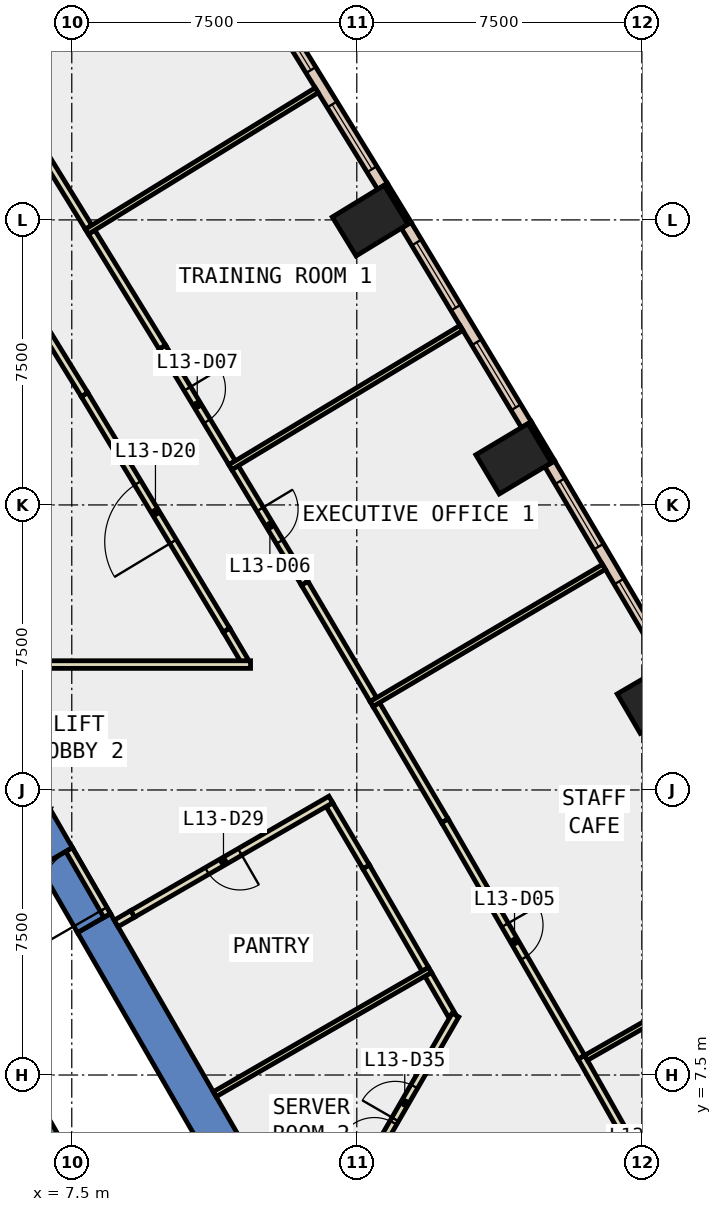
"""IFC4 building model, lengths in metres.
Left out: names, types, materials, properties, quantities, classifications, styles, units other than length and angle.
Written with IfcOpenShell. Run it as: python <this file> out.ifc"""

import sys

from ifc_helpers import new_model, si_unit, direction, frame, frame_2d, origin, origin_2d, place, context, subcontext, project, spatial, polyline, rectangle, outline, extrude, element, fill, save


model = new_model("IFC4")
c1 = context("Model", 3, precision=1e-05, world=origin(), true_north=direction((0.0, 1.0)))
c2 = subcontext(c1, "Body", "Model", "MODEL_VIEW")
j1 = project(units=[si_unit("LENGTHUNIT", "METRE"), si_unit("PLANEANGLEUNIT", "RADIAN")], contexts=[c1])
p1 = place(None, origin())
s1 = spatial("IfcSite", under=j1, at=p1, CompositionType="ELEMENT")
p2 = place(p1, origin())
s2 = spatial("IfcBuilding", under=s1, at=p2, CompositionType="ELEMENT")
p3 = place(p2, frame((0.0, 0.0, 64.4)))
s3 = spatial("IfcBuildingStorey", under=s2, at=p3, CompositionType="ELEMENT", Elevation=64.4)
for number, where, z_axis, x_axis in (
    (1, (22.846, 17.413, -0.4), (0.0, 0.0, 1.0), (-0.504, 0.864, 0.0)),
    (2, (19.127, 23.714, -0.4), (0.0, 0.0, 1.0), (-0.513, 0.858, 0.0)),
    (3, (15.351, 29.981, -0.4), (0.0, 0.0, 1.0), (-0.522, 0.853, 0.0)),
):
    element("IfcColumn", number, at=place(p3, frame(where, z_axis=z_axis, x_axis=x_axis)), inside=s3, PredefinedType="COLUMN", context=c2, shape_type="SweptSolid", body=[
        extrude(rectangle(XDim=1.2, YDim=1.6, at=origin_2d()), origin(), (0.0, 0.0, 1.0), 4.2),
    ])
p4 = place(p3, frame((0.0, 0.0, -0.4)))
e4 = element("IfcWall", 4, at=p4, inside=s3, PredefinedType="SHEAR", context=c2, shape_type="SweptSolid", body=[
    extrude(outline(polyline([(8.517, 11.748), (7.651, 11.248), (12.702, 2.5), (13.856, 2.5), (8.517, 11.748)])), origin(), (0.0, 0.0, 1.0), 4.2),
])
p5 = place(p3, frame((0.0, 0.0, -0.4)))
e5 = element("IfcWall", 5, at=p5, inside=s3, PredefinedType="SHEAR", context=c2, shape_type="SweptSolid", body=[
    extrude(outline(polyline([(6.651, 12.98), (7.517, 13.48), (6.928, 14.5), (6.351, 13.5), (6.651, 12.98)])), origin(), (0.0, 0.0, 1.0), 4.2),
])
p6 = place(p3, frame((0.0, 0.0, 3.6)))
e6 = element("IfcWall", 6, at=p6, inside=s3, PredefinedType="SHEAR", context=c2, shape_type="SweptSolid", body=[
    extrude(outline(polyline([(7.517, 13.48), (6.651, 12.98), (7.651, 11.248), (8.517, 11.748), (7.517, 13.48)])), origin(), (0.0, 0.0, 1.0), 0.2),
])
for number, where, z_axis, x_axis in (
    (7, (20.165, 23.635, 0.0), (0.0, 0.0, 1.0), (-0.513, 0.858, 0.0)),
    (8, (16.389, 29.912, 0.0), (0.0, 0.0, 1.0), (-0.522, 0.853, 0.0)),
):
    element("IfcWall", number, at=place(p3, frame(where, z_axis=z_axis, x_axis=x_axis)), inside=s3, PredefinedType="STANDARD", context=c2, shape_type="SweptSolid", body=[
        extrude(rectangle(XDim=1.2, YDim=0.1, at=frame_2d((0.6, 0.0))), origin(), (0.0, 0.0, 1.0), 3.8),
    ])
p7 = place(p3, frame((23.189, 18.307, 0.0), z_axis=(0.0, 0.0, 1.0), x_axis=(-0.508163938648, 0.861260362177, 0.0)))
e9 = element("IfcWall", 9, at=p7, inside=s3, PredefinedType="STANDARD", context=c2, shape_type="SweptSolid", body=[
    extrude(rectangle(XDim=6.126, YDim=0.3, at=frame_2d((3.063, 0.0))), origin(), (0.0, 0.0, 1.0), 3.8),
])
p8 = place(p7, frame((0.531, 0.0, 0.9)))
e10 = element("IfcOpeningElement", 10, at=p8, cuts=e9, PredefinedType="OPENING", context=c2, shape_type="SweptSolid", body=[
    extrude(rectangle(XDim=2.0, YDim=2.6, at=frame_2d((1.0, 1.3))), frame((0.0, 0.16, 0.0), z_axis=(0.0, -1.0, 0.0), x_axis=(1.0, 0.0, 0.0)), (0.0, 0.0, 1.0), 0.32),
])
p9 = place(p7, frame((3.594, 0.0, 0.9)))
e11 = element("IfcOpeningElement", 11, at=p9, cuts=e9, PredefinedType="OPENING", context=c2, shape_type="SweptSolid", body=[
    extrude(rectangle(XDim=2.0, YDim=2.6, at=frame_2d((1.0, 1.3))), frame((0.0, 0.16, 0.0), z_axis=(0.0, -1.0, 0.0), x_axis=(1.0, 0.0, 0.0)), (0.0, 0.0, 1.0), 0.32),
])
p10 = place(p3, frame((19.462, 24.612, 0.0), z_axis=(0.0, 0.0, 1.0), x_axis=(-0.516147563478, 0.856499674674, 0.0)))
e12 = element("IfcWall", 12, at=p10, inside=s3, PredefinedType="STANDARD", context=c2, shape_type="SweptSolid", body=[
    extrude(rectangle(XDim=6.126, YDim=0.3, at=frame_2d((3.063, 0.0))), origin(), (0.0, 0.0, 1.0), 3.8),
])
p11 = place(p10, frame((0.532, 0.0, 0.9)))
e13 = element("IfcOpeningElement", 13, at=p11, cuts=e12, PredefinedType="OPENING", context=c2, shape_type="SweptSolid", body=[
    extrude(rectangle(XDim=2.0, YDim=2.6, at=frame_2d((1.0, 1.3))), frame((0.0, 0.16, 0.0), z_axis=(0.0, -1.0, 0.0), x_axis=(1.0, 0.0, 0.0)), (0.0, 0.0, 1.0), 0.32),
])
p12 = place(p10, frame((3.595, 0.0, 0.9)))
e14 = element("IfcOpeningElement", 14, at=p12, cuts=e12, PredefinedType="OPENING", context=c2, shape_type="SweptSolid", body=[
    extrude(rectangle(XDim=2.0, YDim=2.6, at=frame_2d((1.0, 1.3))), frame((0.0, 0.16, 0.0), z_axis=(0.0, -1.0, 0.0), x_axis=(1.0, 0.0, 0.0)), (0.0, 0.0, 1.0), 0.32),
])
p13 = place(p3, frame((15.677, 30.882, 0.0), z_axis=(0.0, 0.0, 1.0), x_axis=(-0.524239751329, 0.851570715282, 0.0)))
e15 = element("IfcWall", 15, at=p13, inside=s3, PredefinedType="STANDARD", context=c2, shape_type="SweptSolid", body=[
    extrude(rectangle(XDim=6.125, YDim=0.3, at=frame_2d((3.062, 0.0))), origin(), (0.0, 0.0, 1.0), 3.8),
])
p14 = place(p13, frame((0.531, 0.0, 0.9)))
e16 = element("IfcOpeningElement", 16, at=p14, cuts=e15, PredefinedType="OPENING", context=c2, shape_type="SweptSolid", body=[
    extrude(rectangle(XDim=2.0, YDim=2.6, at=frame_2d((1.0, 1.3))), frame((0.0, 0.16, 0.0), z_axis=(0.0, -1.0, 0.0), x_axis=(1.0, 0.0, 0.0)), (0.0, 0.0, 1.0), 0.32),
])
p15 = place(p13, frame((3.594, 0.0, 0.9)))
e17 = element("IfcOpeningElement", 17, at=p15, cuts=e15, PredefinedType="OPENING", context=c2, shape_type="SweptSolid", body=[
    extrude(rectangle(XDim=2.0, YDim=2.6, at=frame_2d((1.0, 1.3))), frame((0.0, 0.16, 0.0), z_axis=(0.0, -1.0, 0.0), x_axis=(1.0, 0.0, 0.0)), (0.0, 0.0, 1.0), 0.32),
])
p16 = place(p3, frame((17.497, 9.078, 0.0), z_axis=(0.0, 0.0, 1.0), x_axis=(-0.500126451326, 0.865952384768, 0.0)))
e18 = element("IfcWall", 18, at=p16, inside=s3, PredefinedType="PARTITIONING", context=c2, shape_type="SweptSolid", body=[
    extrude(rectangle(XDim=1.238, YDim=0.2, at=frame_2d((0.619, 0.0))), origin(), (0.0, 0.0, 1.0), 3.8),
])
p17 = place(p3, frame((16.803, 10.28, 0.0), z_axis=(0.0, 0.0, 1.0), x_axis=(-0.499941881293, 0.866058956036, 0.0)))
e19 = element("IfcWall", 19, at=p17, inside=s3, PredefinedType="PARTITIONING", context=c2, shape_type="SweptSolid", body=[
    extrude(rectangle(XDim=3.114, YDim=0.2, at=frame_2d((1.557, 0.0))), origin(), (0.0, 0.0, 1.0), 3.8),
])
p18 = place(p3, frame((15.246, 12.977, 0.0), z_axis=(0.0, 0.0, 1.0), x_axis=(-0.508473864329, 0.861077423519, 0.0)))
e20 = element("IfcWall", 20, at=p18, inside=s3, PredefinedType="PARTITIONING", context=c2, shape_type="SweptSolid", body=[
    extrude(rectangle(XDim=1.9, YDim=0.2, at=frame_2d((0.95, 0.0))), origin(), (0.0, 0.0, 1.0), 3.8),
])
p19 = place(p3, frame((14.316, 14.75, 0.0), z_axis=(0.0, 0.0, 1.0), x_axis=(-0.865981716183, -0.500075661512, 0.0)))
e21 = element("IfcWall", 21, at=p19, inside=s3, PredefinedType="PARTITIONING", context=c2, shape_type="SweptSolid", body=[
    extrude(rectangle(XDim=6.023, YDim=0.2, at=frame_2d((3.011, 0.0))), origin(), (0.0, 0.0, 1.0), 3.8),
])
p20 = place(p19, frame((2.761, 0.0, 0.0)))
e22 = element("IfcOpeningElement", 22, at=p20, cuts=e21, PredefinedType="OPENING", context=c2, shape_type="SweptSolid", body=[
    extrude(rectangle(XDim=1.0, YDim=2.1, at=frame_2d((0.5, 1.05))), frame((0.0, 0.11, 0.0), z_axis=(0.0, -1.0, 0.0), x_axis=(1.0, 0.0, 0.0)), (0.0, 0.0, 1.0), 0.22),
])
p21 = place(p3, frame((12.054, 18.386, 0.0), z_axis=(0.0, 0.0, 1.0), x_axis=(-0.508048285953, 0.861328589529, 0.0)))
e23 = element("IfcWall", 23, at=p21, inside=s3, PredefinedType="PARTITIONING", context=c2, shape_type="SweptSolid", body=[
    extrude(rectangle(XDim=0.954, YDim=0.2, at=frame_2d((0.477, 0.0))), origin(), (0.0, 0.0, 1.0), 3.8),
])
p22 = place(p3, frame((11.569, 19.208, 0.0), z_axis=(0.0, 0.0, 1.0), x_axis=(-0.516172233954, 0.85648480716, 0.0)))
e24 = element("IfcWall", 24, at=p22, inside=s3, PredefinedType="PARTITIONING", context=c2, shape_type="SweptSolid", body=[
    extrude(rectangle(XDim=7.234, YDim=0.2, at=frame_2d((3.617, 0.0))), origin(), (0.0, 0.0, 1.0), 3.8),
])
p23 = place(p22, frame((2.717, 0.0, 0.0)))
e25 = element("IfcOpeningElement", 25, at=p23, cuts=e24, PredefinedType="OPENING", context=c2, shape_type="SweptSolid", body=[
    extrude(rectangle(XDim=1.8, YDim=2.1, at=frame_2d((0.9, 1.05))), frame((0.0, 0.11, 0.0), z_axis=(0.0, -1.0, 0.0), x_axis=(1.0, 0.0, 0.0)), (0.0, 0.0, 1.0), 0.22),
])
p24 = place(p3, frame((7.835, 25.404, 0.0), z_axis=(0.0, 0.0, 1.0), x_axis=(-0.524225471951, 0.851579505717, 0.0)))
e26 = element("IfcWall", 26, at=p24, inside=s3, PredefinedType="PARTITIONING", context=c2, shape_type="SweptSolid", body=[
    extrude(rectangle(XDim=7.233, YDim=0.2, at=frame_2d((3.617, 0.0))), origin(), (0.0, 0.0, 1.0), 3.8),
])
p25 = place(p3, frame((20.909, 7.969, 0.0), z_axis=(0.0, 0.0, 1.0), x_axis=(0.491808171064, -0.870703579225, 0.0)))
e27 = element("IfcWall", 27, at=p25, inside=s3, PredefinedType="PARTITIONING", context=c2, shape_type="SweptSolid", body=[
    extrude(rectangle(XDim=7.332, YDim=0.2, at=frame_2d((3.666, 0.0))), origin(), (0.0, 0.0, 1.0), 3.8),
])
p26 = place(p25, frame((3.166, 0.0, 0.0)))
e28 = element("IfcOpeningElement", 28, at=p26, cuts=e27, PredefinedType="OPENING", context=c2, shape_type="SweptSolid", body=[
    extrude(rectangle(XDim=1.0, YDim=2.1, at=frame_2d((0.5, 1.05))), frame((0.0, 0.11, 0.0), z_axis=(0.0, -1.0, 0.0), x_axis=(1.0, 0.0, 0.0)), (0.0, 0.0, 1.0), 0.22),
])
p27 = place(p3, frame((15.512, 17.248, 0.0), z_axis=(0.0, 0.0, 1.0), x_axis=(0.508178415101, -0.861251820564, 0.0)))
e29 = element("IfcWall", 29, at=p27, inside=s3, PredefinedType="PARTITIONING", context=c2, shape_type="SweptSolid", body=[
    extrude(rectangle(XDim=3.554, YDim=0.2, at=frame_2d((1.777, 0.0))), origin(), (0.0, 0.0, 1.0), 3.8),
])
p28 = place(p3, frame((17.318, 14.187, 0.0), z_axis=(0.0, 0.0, 1.0), x_axis=(0.499986381413, -0.866033266336, 0.0)))
e30 = element("IfcWall", 30, at=p28, inside=s3, PredefinedType="PARTITIONING", context=c2, shape_type="SweptSolid", body=[
    extrude(rectangle(XDim=7.18, YDim=0.2, at=frame_2d((3.59, 0.0))), origin(), (0.0, 0.0, 1.0), 3.8),
])
p29 = place(p28, frame((3.165, 0.0, 0.0)))
e31 = element("IfcOpeningElement", 31, at=p29, cuts=e30, PredefinedType="OPENING", context=c2, shape_type="SweptSolid", body=[
    extrude(rectangle(XDim=1.0, YDim=2.1, at=frame_2d((0.5, 1.05))), frame((0.0, 0.11, 0.0), z_axis=(0.0, -1.0, 0.0), x_axis=(1.0, 0.0, 0.0)), (0.0, 0.0, 1.0), 0.22),
])
p30 = place(p3, frame((11.796, 23.481, 0.0), z_axis=(0.0, 0.0, 1.0), x_axis=(0.516070934647, -0.8565458484, 0.0)))
e32 = element("IfcWall", 32, at=p30, inside=s3, PredefinedType="PARTITIONING", context=c2, shape_type="SweptSolid", body=[
    extrude(rectangle(XDim=3.554, YDim=0.2, at=frame_2d((1.777, 0.0))), origin(), (0.0, 0.0, 1.0), 3.8),
])
p31 = place(p30, frame((1.277, 0.0, 0.0)))
e33 = element("IfcOpeningElement", 33, at=p31, cuts=e32, PredefinedType="OPENING", context=c2, shape_type="SweptSolid", body=[
    extrude(rectangle(XDim=1.0, YDim=2.1, at=frame_2d((0.5, 1.05))), frame((0.0, 0.11, 0.0), z_axis=(0.0, -1.0, 0.0), x_axis=(1.0, 0.0, 0.0)), (0.0, 0.0, 1.0), 0.22),
])
p32 = place(p3, frame((13.63, 20.437, 0.0), z_axis=(0.0, 0.0, 1.0), x_axis=(0.508298695021, -0.861180838523, 0.0)))
e34 = element("IfcWall", 34, at=p32, inside=s3, PredefinedType="PARTITIONING", context=c2, shape_type="SweptSolid", body=[
    extrude(rectangle(XDim=3.553, YDim=0.2, at=frame_2d((1.777, 0.0))), origin(), (0.0, 0.0, 1.0), 3.8),
])
p33 = place(p3, frame((8.022, 29.678, 0.0), z_axis=(0.0, 0.0, 1.0), x_axis=(0.524093591744, -0.851660676029, 0.0)))
e35 = element("IfcWall", 35, at=p33, inside=s3, PredefinedType="PARTITIONING", context=c2, shape_type="SweptSolid", body=[
    extrude(rectangle(XDim=3.553, YDim=0.2, at=frame_2d((1.776, 0.0))), origin(), (0.0, 0.0, 1.0), 3.8),
])
p34 = place(p3, frame((9.884, 26.652, 0.0), z_axis=(0.0, 0.0, 1.0), x_axis=(0.516162051318, -0.856490943781, 0.0)))
e36 = element("IfcWall", 36, at=p34, inside=s3, PredefinedType="PARTITIONING", context=c2, shape_type="SweptSolid", body=[
    extrude(rectangle(XDim=3.553, YDim=0.2, at=frame_2d((1.777, 0.0))), origin(), (0.0, 0.0, 1.0), 3.8),
])
p35 = place(p34, frame((1.277, 0.0, 0.0)))
e37 = element("IfcOpeningElement", 37, at=p35, cuts=e36, PredefinedType="OPENING", context=c2, shape_type="SweptSolid", body=[
    extrude(rectangle(XDim=1.0, YDim=2.1, at=frame_2d((0.5, 1.05))), frame((0.0, 0.11, 0.0), z_axis=(0.0, -1.0, 0.0), x_axis=(1.0, 0.0, 0.0)), (0.0, 0.0, 1.0), 0.22),
])
p36 = place(p3, frame((6.081, 32.832, 0.0), z_axis=(0.0, 0.0, 1.0), x_axis=(0.524062922014, -0.851679548756, 0.0)))
e38 = element("IfcWall", 38, at=p36, inside=s3, PredefinedType="PARTITIONING", context=c2, shape_type="SweptSolid", body=[
    extrude(rectangle(XDim=3.553, YDim=0.2, at=frame_2d((1.777, 0.0))), origin(), (0.0, 0.0, 1.0), 3.8),
])
p37 = place(p3, frame((11.261, 6.994, 0.0), z_axis=(0.0, 0.0, 1.0), x_axis=(0.866043905515, 0.499967952693, 0.0)))
e39 = element("IfcWall", 39, at=p37, inside=s3, PredefinedType="PARTITIONING", context=c2, shape_type="SweptSolid", body=[
    extrude(rectangle(XDim=6.542, YDim=0.15, at=frame_2d((3.271, 0.0))), origin(), (0.0, 0.0, 1.0), 3.8),
])
p38 = place(p3, frame((13.827, 2.55, 0.0), z_axis=(0.0, 0.0, 1.0), x_axis=(0.500116794417, 0.865957961995, 0.0)))
e40 = element("IfcWall", 40, at=p38, inside=s3, PredefinedType="PARTITIONING", context=c2, shape_type="SweptSolid", body=[
    extrude(rectangle(XDim=7.538, YDim=0.2, at=frame_2d((3.769, 0.0))), origin(), (0.0, 0.0, 1.0), 3.8),
])
p39 = place(p38, frame((3.269, 0.0, 0.0)))
e41 = element("IfcOpeningElement", 41, at=p39, cuts=e40, PredefinedType="OPENING", context=c2, shape_type="SweptSolid", body=[
    extrude(rectangle(XDim=1.0, YDim=2.1, at=frame_2d((0.5, 1.05))), frame((0.0, 0.11, 0.0), z_axis=(0.0, -1.0, 0.0), x_axis=(1.0, 0.0, 0.0)), (0.0, 0.0, 1.0), 0.22),
])
p40 = place(p38, frame((4.369, 0.0, 0.0)))
e42 = element("IfcOpeningElement", 42, at=p40, cuts=e40, PredefinedType="OPENING", context=c2, shape_type="SweptSolid", body=[
    extrude(rectangle(XDim=1.0, YDim=2.1, at=frame_2d((0.5, 1.05))), frame((0.0, 0.11, 0.0), z_axis=(0.0, -1.0, 0.0), x_axis=(1.0, 0.0, 0.0)), (0.0, 0.0, 1.0), 0.22),
])
p41 = place(p3, frame((21.033, 7.953, 0.0), z_axis=(0.0, 0.0, 1.0), x_axis=(0.868311678357, 0.496018980715, 0.0)))
e43 = element("IfcWall", 43, at=p41, inside=s3, PredefinedType="PARTITIONING", context=c2, shape_type="SweptSolid", body=[
    extrude(rectangle(XDim=5.48, YDim=0.15, at=frame_2d((2.74, 0.0))), origin(), (0.0, 0.0, 1.0), 3.8),
])
p42 = place(p3, frame((15.388, 17.261, 0.0), z_axis=(0.0, 0.0, 1.0), x_axis=(0.861189945173, 0.50828326584, 0.0)))
e44 = element("IfcWall", 44, at=p42, inside=s3, PredefinedType="PARTITIONING", context=c2, shape_type="SweptSolid", body=[
    extrude(rectangle(XDim=7.101, YDim=0.15, at=frame_2d((3.55, 0.0))), origin(), (0.0, 0.0, 1.0), 3.8),
])
p43 = place(p3, frame((11.672, 23.493, 0.0), z_axis=(0.0, 0.0, 1.0), x_axis=(0.856462653555, 0.516208991656, 0.0)))
e45 = element("IfcWall", 45, at=p43, inside=s3, PredefinedType="PARTITIONING", context=c2, shape_type="SweptSolid", body=[
    extrude(rectangle(XDim=7.1, YDim=0.15, at=frame_2d((3.55, 0.0))), origin(), (0.0, 0.0, 1.0), 3.8),
])
p44 = place(p3, frame((7.897, 29.69, 0.0), z_axis=(0.0, 0.0, 1.0), x_axis=(0.851604009471, 0.524185664677, 0.0)))
e46 = element("IfcWall", 46, at=p44, inside=s3, PredefinedType="PARTITIONING", context=c2, shape_type="SweptSolid", body=[
    extrude(rectangle(XDim=7.101, YDim=0.15, at=frame_2d((3.55, 0.0))), origin(), (0.0, 0.0, 1.0), 3.8),
])
p45 = place(p3, frame((8.43, 11.698, 0.0), z_axis=(0.0, 0.0, 1.0), x_axis=(-0.50002537861, 0.866010750942, 0.0)))
e47 = element("IfcWall", 47, at=p45, inside=s3, PredefinedType="PARTITIONING", context=c2, shape_type="SweptSolid", body=[
    extrude(rectangle(XDim=2.0, YDim=0.2, at=frame_2d((1.0, 0.0))), origin(), (0.0, 0.0, 1.0), 2.4),
])
p46 = place(p45, frame((0.19, 0.0, 0.0)))
e48 = element("IfcOpeningElement", 48, at=p46, cuts=e47, PredefinedType="OPENING", context=c2, shape_type="SweptSolid", body=[
    extrude(rectangle(XDim=1.8, YDim=2.1, at=frame_2d((0.9, 1.05))), frame((0.0, 0.11, 0.0), z_axis=(0.0, -1.0, 0.0), x_axis=(1.0, 0.0, 0.0)), (0.0, 0.0, 1.0), 0.22),
])
p47 = place(p3, frame((0.4, 18.3, 0.0), z_axis=(0.0, 0.0, 1.0), x_axis=(1.0, 0.0, 0.0)))
e49 = element("IfcWall", 49, at=p47, inside=s3, PredefinedType="PARTITIONING", context=c2, shape_type="SweptSolid", body=[
    extrude(rectangle(XDim=11.804, YDim=0.2, at=frame_2d((5.902, 0.0))), origin(), (0.0, 0.0, 1.0), 3.8),
])
p48 = place(p3, frame((9.1, 11.738, 0.0), z_axis=(0.0, 0.0, 1.0), x_axis=(-0.866071776036, -0.499919672301, 0.0)))
e50 = element("IfcWall", 50, at=p48, inside=s3, PredefinedType="PARTITIONING", context=c2, shape_type="SweptSolid", body=[
    extrude(rectangle(XDim=0.5, YDim=0.2, at=frame_2d((0.25, 0.0))), origin(), (0.0, 0.0, 1.0), 2.4),
])
p49 = place(p3, frame((8.48, 3.412, 0.0), z_axis=(0.0, 0.0, 1.0), x_axis=(-0.499978703459, 0.866037698999, 0.0)))
e51 = element("IfcWall", 51, at=p49, inside=s3, PredefinedType="STANDARD", context=c2, shape_type="SweptSolid", body=[
    extrude(rectangle(XDim=6.9, YDim=0.2, at=frame_2d((3.45, 0.0))), origin(), (0.0, 0.0, 1.0), 3.8),
])
p50 = place(p8, origin())
e52 = element("IfcWindow", 52, at=p50, inside=s3, PartitioningType="SINGLE_PANEL", PredefinedType="WINDOW", context=c2, shape_type="SweptSolid", body=[
    extrude(rectangle(XDim=2.0, YDim=2.6, at=frame_2d((1.0, 1.3))), frame((0.0, 0.03, 0.0), z_axis=(0.0, -1.0, 0.0), x_axis=(1.0, 0.0, 0.0)), (0.0, 0.0, 1.0), 0.06),
])
fill(e10, e52)
p51 = place(p9, origin())
e53 = element("IfcWindow", 53, at=p51, inside=s3, PartitioningType="SINGLE_PANEL", PredefinedType="WINDOW", context=c2, shape_type="SweptSolid", body=[
    extrude(rectangle(XDim=2.0, YDim=2.6, at=frame_2d((1.0, 1.3))), frame((0.0, 0.03, 0.0), z_axis=(0.0, -1.0, 0.0), x_axis=(1.0, 0.0, 0.0)), (0.0, 0.0, 1.0), 0.06),
])
fill(e11, e53)
p52 = place(p11, origin())
e54 = element("IfcWindow", 54, at=p52, inside=s3, PartitioningType="SINGLE_PANEL", PredefinedType="WINDOW", context=c2, shape_type="SweptSolid", body=[
    extrude(rectangle(XDim=2.0, YDim=2.6, at=frame_2d((1.0, 1.3))), frame((0.0, 0.03, 0.0), z_axis=(0.0, -1.0, 0.0), x_axis=(1.0, 0.0, 0.0)), (0.0, 0.0, 1.0), 0.06),
])
fill(e13, e54)
p53 = place(p12, origin())
e55 = element("IfcWindow", 55, at=p53, inside=s3, PartitioningType="SINGLE_PANEL", PredefinedType="WINDOW", context=c2, shape_type="SweptSolid", body=[
    extrude(rectangle(XDim=2.0, YDim=2.6, at=frame_2d((1.0, 1.3))), frame((0.0, 0.03, 0.0), z_axis=(0.0, -1.0, 0.0), x_axis=(1.0, 0.0, 0.0)), (0.0, 0.0, 1.0), 0.06),
])
fill(e14, e55)
p54 = place(p14, origin())
e56 = element("IfcWindow", 56, at=p54, inside=s3, PartitioningType="SINGLE_PANEL", PredefinedType="WINDOW", context=c2, shape_type="SweptSolid", body=[
    extrude(rectangle(XDim=2.0, YDim=2.6, at=frame_2d((1.0, 1.3))), frame((0.0, 0.03, 0.0), z_axis=(0.0, -1.0, 0.0), x_axis=(1.0, 0.0, 0.0)), (0.0, 0.0, 1.0), 0.06),
])
fill(e16, e56)
p55 = place(p15, origin())
e57 = element("IfcWindow", 57, at=p55, inside=s3, PartitioningType="SINGLE_PANEL", PredefinedType="WINDOW", context=c2, shape_type="SweptSolid", body=[
    extrude(rectangle(XDim=2.0, YDim=2.6, at=frame_2d((1.0, 1.3))), frame((0.0, 0.03, 0.0), z_axis=(0.0, -1.0, 0.0), x_axis=(1.0, 0.0, 0.0)), (0.0, 0.0, 1.0), 0.06),
])
fill(e17, e57)
p56 = place(p29, origin())
e58 = element("IfcDoor", 58, at=p56, inside=s3, OperationType="SINGLE_SWING_LEFT", PredefinedType="DOOR", context=c2, shape_type="SweptSolid", body=[
    extrude(rectangle(XDim=1.0, YDim=2.1, at=frame_2d((0.5, 1.05))), frame((0.0, 0.025, 0.0), z_axis=(0.0, -1.0, 0.0), x_axis=(1.0, 0.0, 0.0)), (0.0, 0.0, 1.0), 0.05),
])
fill(e31, e58)
p57 = place(p31, origin())
e59 = element("IfcDoor", 59, at=p57, inside=s3, OperationType="SINGLE_SWING_LEFT", PredefinedType="DOOR", context=c2, shape_type="SweptSolid", body=[
    extrude(rectangle(XDim=1.0, YDim=2.1, at=frame_2d((0.5, 1.05))), frame((0.0, 0.025, 0.0), z_axis=(0.0, -1.0, 0.0), x_axis=(1.0, 0.0, 0.0)), (0.0, 0.0, 1.0), 0.05),
])
fill(e33, e59)
p58 = place(p35, origin())
e60 = element("IfcDoor", 60, at=p58, inside=s3, OperationType="SINGLE_SWING_LEFT", PredefinedType="DOOR", context=c2, shape_type="SweptSolid", body=[
    extrude(rectangle(XDim=1.0, YDim=2.1, at=frame_2d((0.5, 1.05))), frame((0.0, 0.025, 0.0), z_axis=(0.0, -1.0, 0.0), x_axis=(1.0, 0.0, 0.0)), (0.0, 0.0, 1.0), 0.05),
])
fill(e37, e60)
p59 = place(p23, origin())
e61 = element("IfcDoor", 61, at=p59, inside=s3, OperationType="DOUBLE_DOOR_SINGLE_SWING", PredefinedType="DOOR", context=c2, shape_type="SweptSolid", body=[
    extrude(rectangle(XDim=1.8, YDim=2.1, at=frame_2d((0.9, 1.05))), frame((0.0, 0.025, 0.0), z_axis=(0.0, -1.0, 0.0), x_axis=(1.0, 0.0, 0.0)), (0.0, 0.0, 1.0), 0.05),
])
fill(e25, e61)
p60 = place(p39, origin())
e62 = element("IfcDoor", 62, at=p60, inside=s3, OperationType="SINGLE_SWING_LEFT", PredefinedType="DOOR", context=c2, shape_type="SweptSolid", body=[
    extrude(rectangle(XDim=1.0, YDim=2.1, at=frame_2d((0.5, 1.05))), frame((0.0, 0.025, 0.0), z_axis=(0.0, -1.0, 0.0), x_axis=(1.0, 0.0, 0.0)), (0.0, 0.0, 1.0), 0.05),
])
fill(e41, e62)
p61 = place(p20, origin())
e63 = element("IfcDoor", 63, at=p61, inside=s3, OperationType="SINGLE_SWING_LEFT", PredefinedType="DOOR", context=c2, shape_type="SweptSolid", body=[
    extrude(rectangle(XDim=1.0, YDim=2.1, at=frame_2d((0.5, 1.05))), frame((0.0, 0.025, 0.0), z_axis=(0.0, -1.0, 0.0), x_axis=(1.0, 0.0, 0.0)), (0.0, 0.0, 1.0), 0.05),
])
fill(e22, e63)
p62 = place(p40, origin())
e64 = element("IfcDoor", 64, at=p62, inside=s3, OperationType="SINGLE_SWING_RIGHT", PredefinedType="DOOR", context=c2, shape_type="SweptSolid", body=[
    extrude(rectangle(XDim=1.0, YDim=2.1, at=frame_2d((0.5, 1.05))), frame((0.0, 0.025, 0.0), z_axis=(0.0, -1.0, 0.0), x_axis=(1.0, 0.0, 0.0)), (0.0, 0.0, 1.0), 0.05),
])
fill(e42, e64)
p63 = place(p46, origin())
e65 = element("IfcDoor", 65, at=p63, inside=s3, OperationType="DOUBLE_DOOR_SINGLE_SWING", PredefinedType="DOOR", context=c2, shape_type="SweptSolid", body=[
    extrude(rectangle(XDim=1.8, YDim=2.1, at=frame_2d((0.9, 1.05))), frame((0.0, 0.025, 0.0), z_axis=(0.0, -1.0, 0.0), x_axis=(1.0, 0.0, 0.0)), (0.0, 0.0, 1.0), 0.05),
])
fill(e48, e65)
save(model, sys.argv[1])
